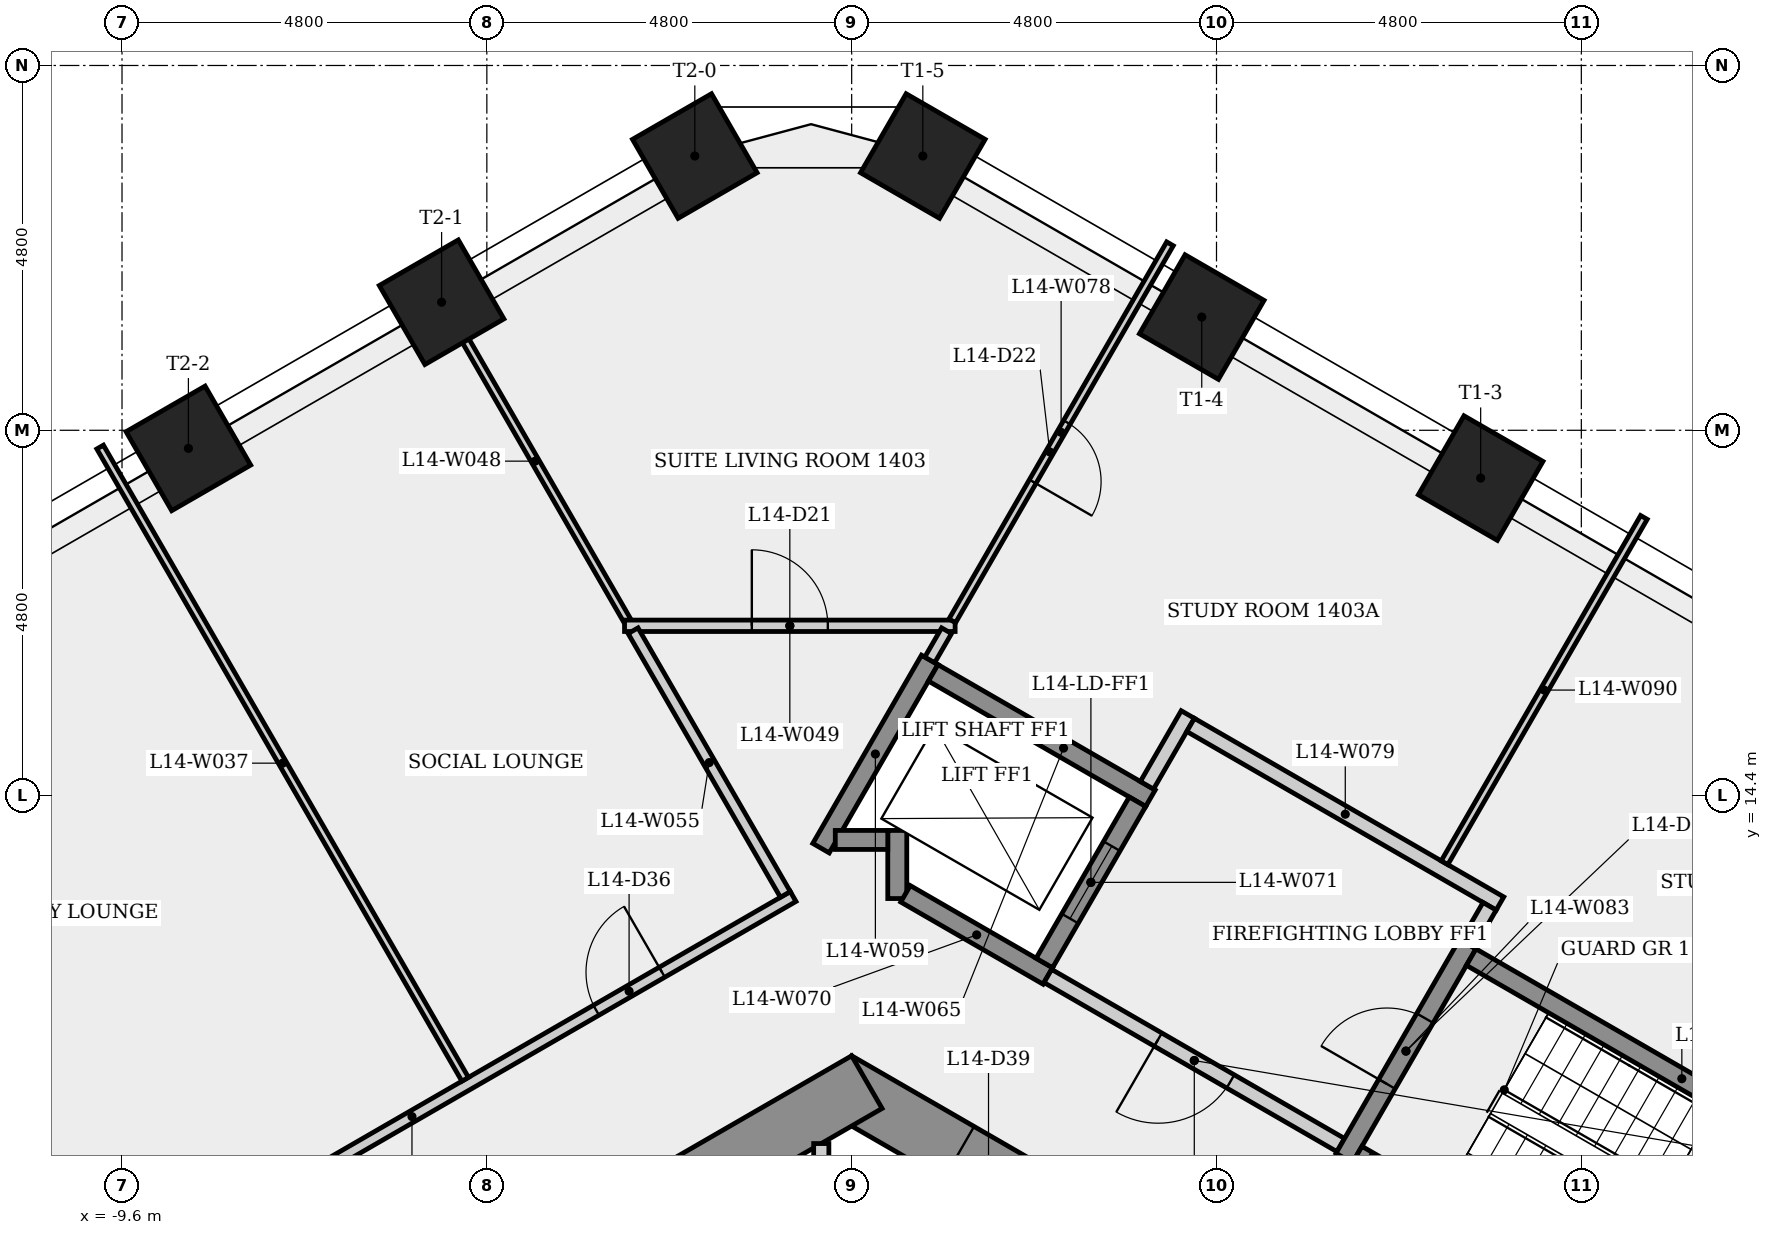
"""IFC4 building model, lengths in metres.
Left out: names, types, materials, properties, quantities, classifications, styles, units other than length and angle.
Written with IfcOpenShell. Run it as: python <this file> out.ifc"""

import sys

from ifc_helpers import new_model, si_unit, direction, frame, frame_2d, origin, origin_2d, place, context, subcontext, project, spatial, rectangle, extrude, element, fill, save


model = new_model("IFC4")
c1 = context("Model", 3, precision=1e-05, world=origin(), true_north=direction((0.0, 1.0)))
c2 = subcontext(c1, "Body", "Model", "MODEL_VIEW")
j1 = project(units=[si_unit("LENGTHUNIT", "METRE"), si_unit("PLANEANGLEUNIT", "RADIAN")], contexts=[c1])
p1 = place(None, origin())
s1 = spatial("IfcSite", under=j1, at=p1, CompositionType="ELEMENT")
p2 = place(p1, origin())
s2 = spatial("IfcBuilding", under=s1, at=p2, CompositionType="ELEMENT")
p3 = place(p2, frame((0.0, 0.0, 56.1)))
s3 = spatial("IfcBuildingStorey", under=s2, at=p3, CompositionType="ELEMENT", Elevation=56.1)
p4 = place(p3, frame((9.3, 5.138, 0.0), z_axis=(0.0, 0.0, 1.0), x_axis=(-0.866023993627, 0.500002442456, 0.0)))
e1 = element("IfcWall", 1, at=p4, inside=s3, PredefinedType="SHEAR", context=c2, shape_type="SweptSolid", body=[
    extrude(rectangle(XDim=10.97, YDim=0.8, at=frame_2d((5.485, 0.0))), origin(), (0.0, 0.0, 1.0), 3.4),
])
p5 = place(p4, frame((8.21, 0.0, 0.0)))
e2 = element("IfcOpeningElement", 2, at=p5, cuts=e1, PredefinedType="OPENING", context=c2, shape_type="SweptSolid", body=[
    extrude(rectangle(XDim=0.9, YDim=2.1, at=frame_2d((0.45, 1.05))), frame((0.0, 0.41, 0.0), z_axis=(0.0, -1.0, 0.0), x_axis=(1.0, 0.0, 0.0)), (0.0, 0.0, 1.0), 0.82),
])
p6 = place(p4, frame((2.126, 0.0, 0.0)))
e3 = element("IfcOpeningElement", 3, at=p6, cuts=e1, PredefinedType="OPENING", context=c2, shape_type="SweptSolid", body=[
    extrude(rectangle(XDim=0.9, YDim=2.1, at=frame_2d((0.45, 1.05))), frame((0.0, 0.41, 0.0), z_axis=(0.0, -1.0, 0.0), x_axis=(1.0, 0.0, 0.0)), (0.0, 0.0, 1.0), 0.82),
])
p7 = place(p3, frame((0.2, 10.623, 0.0), z_axis=(0.0, 0.0, 1.0), x_axis=(-0.866023993627, -0.500002442456, 0.0)))
e4 = element("IfcWall", 4, at=p7, inside=s3, PredefinedType="SHEAR", context=c2, shape_type="SweptSolid", body=[
    extrude(rectangle(XDim=10.97, YDim=0.8, at=frame_2d((5.485, 0.0))), origin(), (0.0, 0.0, 1.0), 3.4),
])
p8 = place(p7, frame((6.877, 0.0, 0.0)))
e5 = element("IfcOpeningElement", 5, at=p8, cuts=e4, PredefinedType="OPENING", context=c2, shape_type="SweptSolid", body=[
    extrude(rectangle(XDim=0.9, YDim=2.1, at=frame_2d((0.45, 1.05))), frame((0.0, 0.41, 0.0), z_axis=(0.0, -1.0, 0.0), x_axis=(1.0, 0.0, 0.0)), (0.0, 0.0, 1.0), 0.82),
])
for number, where, z_axis, x_axis in (
    (6, (8.276, 18.571, 0.0), (0.0, 0.0, 1.0), (0.5, 0.866, 0.0)),
    (7, (4.606, 20.69, 0.0), (0.0, 0.0, 1.0), (0.5, 0.866, 0.0)),
    (8, (0.936, 22.808, 0.0), (0.0, 0.0, 1.0), (0.5, 0.866, 0.0)),
    (9, (-2.064, 22.808, 0.0), (0.0, 0.0, 1.0), (-0.5, 0.866, 0.0)),
    (10, (-5.395, 20.885, 0.0), (0.0, 0.0, 1.0), (-0.5, 0.866, 0.0)),
    (11, (-8.727, 18.962, 0.0), (0.0, 0.0, 1.0), (-0.5, 0.866, 0.0)),
):
    element("IfcColumn", number, at=place(p3, frame(where, z_axis=z_axis, x_axis=x_axis)), inside=s3, PredefinedType="COLUMN", context=c2, shape_type="SweptSolid", body=[
        extrude(rectangle(XDim=1.2, YDim=1.2, at=origin_2d()), origin(), (0.0, 0.0, 1.0), 3.4),
    ])
p9 = place(p3, frame((-10.8, 7.275, 0.0), z_axis=(0.0, 0.0, 1.0), x_axis=(0.866027969706, 0.499995555667, 0.0)))
e12 = element("IfcWall", 12, at=p9, inside=s3, PredefinedType="PARTITIONING", context=c2, shape_type="SweptSolid", body=[
    extrude(rectangle(XDim=11.582, YDim=0.15, at=frame_2d((5.791, 0.0))), origin(), (0.0, 0.0, 1.0), 3.05),
])
p10 = place(p9, frame((8.589, 0.0, 0.0)))
e13 = element("IfcOpeningElement", 13, at=p10, cuts=e12, PredefinedType="OPENING", context=c2, shape_type="SweptSolid", body=[
    extrude(rectangle(XDim=1.0, YDim=2.1, at=frame_2d((0.5, 1.05))), frame((0.0, 0.085, 0.0), z_axis=(0.0, -1.0, 0.0), x_axis=(1.0, 0.0, 0.0)), (0.0, 0.0, 1.0), 0.17),
])
p11 = place(p3, frame((-5.085, 10.661, 0.0), z_axis=(0.0, 0.0, 1.0), x_axis=(-0.49998793222, 0.866032371008, 0.0)))
e14 = element("IfcWall", 14, at=p11, inside=s3, PredefinedType="PARTITIONING", context=c2, shape_type="SweptSolid", body=[
    extrude(rectangle(XDim=9.606, YDim=0.1, at=frame_2d((4.803, 0.0))), origin(), (0.0, 0.0, 1.0), 3.05),
])
p12 = place(p3, frame((-2.951, 16.692, 0.0), z_axis=(0.0, 0.0, 1.0), x_axis=(-0.499975014836, 0.866039828495, 0.0)))
e15 = element("IfcWall", 15, at=p12, inside=s3, PredefinedType="PARTITIONING", context=c2, shape_type="SweptSolid", body=[
    extrude(rectangle(XDim=4.853, YDim=0.1, at=frame_2d((2.427, 0.0))), origin(), (0.0, 0.0, 1.0), 3.05),
])
p13 = place(p3, frame((-2.988, 16.627, 0.0), z_axis=(0.0, 0.0, 1.0), x_axis=(1.0, 0.0, 0.0)))
e16 = element("IfcWall", 16, at=p13, inside=s3, PredefinedType="PARTITIONING", context=c2, shape_type="SweptSolid", body=[
    extrude(rectangle(XDim=4.349, YDim=0.15, at=frame_2d((2.175, 0.0))), origin(), (0.0, 0.0, 1.0), 3.05),
])
p14 = place(p13, frame((1.675, 0.0, 0.0)))
e17 = element("IfcOpeningElement", 17, at=p14, cuts=e16, PredefinedType="OPENING", context=c2, shape_type="SweptSolid", body=[
    extrude(rectangle(XDim=1.0, YDim=2.1, at=frame_2d((0.5, 1.05))), frame((0.0, 0.085, 0.0), z_axis=(0.0, -1.0, 0.0), x_axis=(1.0, 0.0, 0.0)), (0.0, 0.0, 1.0), 0.17),
])
p15 = place(p3, frame((-0.873, 13.093, 0.0), z_axis=(0.0, 0.0, 1.0), x_axis=(-0.500031897912, 0.866006986733, 0.0)))
e18 = element("IfcWall", 18, at=p15, inside=s3, PredefinedType="PARTITIONING", context=c2, shape_type="SweptSolid", body=[
    extrude(rectangle(XDim=4.007, YDim=0.15, at=frame_2d((2.003, 0.0))), origin(), (0.0, 0.0, 1.0), 3.05),
])
p16 = place(p3, frame((-0.4, 9.815, 0.0), z_axis=(0.0, 0.0, 1.0), x_axis=(0.0, -1.0, 0.0)))
e19 = element("IfcWall", 19, at=p16, inside=s3, PredefinedType="PARTITIONING", context=c2, shape_type="SweptSolid", body=[
    extrude(rectangle(XDim=4.54, YDim=0.2, at=frame_2d((2.27, 0.0))), origin(), (0.0, 0.0, 1.0), 3.05),
])
p17 = place(p3, frame((-0.403, 13.702, 0.0), z_axis=(0.0, 0.0, 1.0), x_axis=(0.499976111731, 0.866039195244, 0.0)))
e20 = element("IfcWall", 20, at=p17, inside=s3, PredefinedType="SHEAR", context=c2, shape_type="SweptSolid", body=[
    extrude(rectangle(XDim=2.861, YDim=0.25, at=frame_2d((1.43, 0.0))), origin(), (0.0, 0.0, 1.0), 3.05),
])
p18 = place(p3, frame((0.6, 13.039, 0.0), z_axis=(0.0, 0.0, 1.0), x_axis=(0.0, 1.0, 0.0)))
e21 = element("IfcWall", 21, at=p18, inside=s3, PredefinedType="SHEAR", context=c2, shape_type="SweptSolid", body=[
    extrude(rectangle(XDim=0.896, YDim=0.25, at=frame_2d((0.448, 0.0))), origin(), (0.0, 0.0, 1.0), 3.05),
])
p19 = place(p3, frame((0.475, 13.81, 0.0), z_axis=(0.0, 0.0, 1.0), x_axis=(-1.0, 0.0, 0.0)))
e22 = element("IfcWall", 22, at=p19, inside=s3, PredefinedType="SHEAR", context=c2, shape_type="SweptSolid", body=[
    extrude(rectangle(XDim=0.691, YDim=0.25, at=frame_2d((0.345, 0.0))), origin(), (0.0, 0.0, 1.0), 3.4),
])
p20 = place(p3, frame((1.073, 16.008, 0.0), z_axis=(0.0, 0.0, 1.0), x_axis=(0.866040211805, -0.499974350878, 0.0)))
e23 = element("IfcWall", 23, at=p20, inside=s3, PredefinedType="SHEAR", context=c2, shape_type="SweptSolid", body=[
    extrude(rectangle(XDim=3.3, YDim=0.25, at=frame_2d((1.65, 0.0))), origin(), (0.0, 0.0, 1.0), 3.05),
])
p21 = place(p3, frame((1.249, 16.562, 0.0), z_axis=(0.0, 0.0, 1.0), x_axis=(-0.49999285859, -0.86602952684, 0.0)))
e24 = element("IfcWall", 24, at=p21, inside=s3, PredefinedType="PARTITIONING", context=c2, shape_type="SweptSolid", body=[
    extrude(rectangle(XDim=0.443, YDim=0.15, at=frame_2d((0.221, 0.0))), origin(), (0.0, 0.0, 1.0), 3.05),
])
p22 = place(p3, frame((2.581, 12.02, 0.0), z_axis=(0.0, 0.0, 1.0), x_axis=(-0.86603892542, 0.499976579108, 0.0)))
e25 = element("IfcWall", 25, at=p22, inside=s3, PredefinedType="SHEAR", context=c2, shape_type="SweptSolid", body=[
    extrude(rectangle(XDim=2.162, YDim=0.25, at=frame_2d((1.081, 0.0))), origin(), (0.0, 0.0, 1.0), 3.05),
])
p23 = place(p3, frame((2.535, 12.191, 0.0), z_axis=(0.0, 0.0, 1.0), x_axis=(0.500061746146, 0.865989751695, 0.0)))
e26 = element("IfcWall", 26, at=p23, inside=s3, PredefinedType="SHEAR", context=c2, shape_type="SweptSolid", body=[
    extrude(rectangle(XDim=2.45, YDim=0.25, at=frame_2d((1.225, 0.0))), origin(), (0.0, 0.0, 1.0), 3.4),
])
p24 = place(p23, frame((0.675, 0.0, 0.0)))
e27 = element("IfcOpeningElement", 27, at=p24, cuts=e26, PredefinedType="OPENING", context=c2, shape_type="SweptSolid", body=[
    extrude(rectangle(XDim=1.1, YDim=2.1, at=frame_2d((0.55, 1.05))), frame((0.0, 0.135, 0.0), z_axis=(0.0, -1.0, 0.0), x_axis=(1.0, 0.0, 0.0)), (0.0, 0.0, 1.0), 0.27),
])
p25 = place(p3, frame((3.885, 14.529, 0.0), z_axis=(0.0, 0.0, 1.0), x_axis=(0.499997628298, 0.866026773083, 0.0)))
e28 = element("IfcWall", 28, at=p25, inside=s3, PredefinedType="PARTITIONING", context=c2, shape_type="SweptSolid", body=[
    extrude(rectangle(XDim=1.075, YDim=0.2, at=frame_2d((0.538, 0.0))), origin(), (0.0, 0.0, 1.0), 3.05),
])
p26 = place(p3, frame((4.188, 21.654, 0.0), z_axis=(0.0, 0.0, 1.0), x_axis=(-0.500021260655, -0.866013128592, 0.0)))
e29 = element("IfcWall", 29, at=p26, inside=s3, PredefinedType="PARTITIONING", context=c2, shape_type="SweptSolid", body=[
    extrude(rectangle(XDim=5.729, YDim=0.1, at=frame_2d((2.864, 0.0))), origin(), (0.0, 0.0, 1.0), 3.05),
])
p27 = place(p26, frame((2.712, 0.0, 0.0)))
e30 = element("IfcOpeningElement", 30, at=p27, cuts=e29, PredefinedType="OPENING", context=c2, shape_type="SweptSolid", body=[
    extrude(rectangle(XDim=0.9, YDim=2.1, at=frame_2d((0.45, 1.05))), frame((0.0, 0.06, 0.0), z_axis=(0.0, -1.0, 0.0), x_axis=(1.0, 0.0, 0.0)), (0.0, 0.0, 1.0), 0.12),
])
p28 = place(p3, frame((4.459, 15.323, 0.0), z_axis=(0.0, 0.0, 1.0), x_axis=(0.866016039709, -0.500016218704, 0.0)))
e31 = element("IfcWall", 31, at=p28, inside=s3, PredefinedType="PARTITIONING", context=c2, shape_type="SweptSolid", body=[
    extrude(rectangle(XDim=4.7, YDim=0.2, at=frame_2d((2.35, 0.0))), origin(), (0.0, 0.0, 1.0), 3.05),
])
p29 = place(p3, frame((6.435, 9.795, 0.0), z_axis=(0.0, 0.0, 1.0), x_axis=(-0.866012907634, 0.500021643343, 0.0)))
e32 = element("IfcWall", 32, at=p29, inside=s3, PredefinedType="PARTITIONING", context=c2, shape_type="SweptSolid", body=[
    extrude(rectangle(XDim=4.45, YDim=0.2, at=frame_2d((2.225, 0.0))), origin(), (0.0, 0.0, 1.0), 3.05),
])
p30 = place(p29, frame((1.675, 0.0, 0.0)))
e33 = element("IfcOpeningElement", 33, at=p30, cuts=e32, PredefinedType="OPENING", context=c2, shape_type="SweptSolid", body=[
    extrude(rectangle(XDim=1.1, YDim=2.1, at=frame_2d((0.55, 1.05))), frame((0.0, 0.11, 0.0), z_axis=(0.0, -1.0, 0.0), x_axis=(1.0, 0.0, 0.0)), (0.0, 0.0, 1.0), 0.22),
])
p31 = place(p3, frame((6.48, 9.624, 0.0), z_axis=(0.0, 0.0, 1.0), x_axis=(0.500017246033, 0.866015446554, 0.0)))
e34 = element("IfcWall", 34, at=p31, inside=s3, PredefinedType="SHEAR", context=c2, shape_type="SweptSolid", body=[
    extrude(rectangle(XDim=3.25, YDim=0.25, at=frame_2d((1.625, 0.0))), origin(), (0.0, 0.0, 1.0), 3.05),
])
p32 = place(p31, frame((1.125, 0.0, 0.0)))
e35 = element("IfcOpeningElement", 35, at=p32, cuts=e34, PredefinedType="OPENING", context=c2, shape_type="SweptSolid", body=[
    extrude(rectangle(XDim=1.0, YDim=2.1, at=frame_2d((0.5, 1.05))), frame((0.0, 0.135, 0.0), z_axis=(0.0, -1.0, 0.0), x_axis=(1.0, 0.0, 0.0)), (0.0, 0.0, 1.0), 0.27),
])
p33 = place(p3, frame((7.8, 13.51, 0.0), z_axis=(0.0, 0.0, 1.0), x_axis=(0.499962800384, 0.866046879928, 0.0)))
e36 = element("IfcWall", 36, at=p33, inside=s3, PredefinedType="PARTITIONING", context=c2, shape_type="SweptSolid", body=[
    extrude(rectangle(XDim=5.247, YDim=0.1, at=frame_2d((2.623, 0.0))), origin(), (0.0, 0.0, 1.0), 3.05),
])
p34 = place(p3, frame((8.151, 12.268, 0.0), z_axis=(0.0, 0.0, 1.0), x_axis=(0.866025499775, -0.499999833739, 0.0)))
e37 = element("IfcWall", 37, at=p34, inside=s3, PredefinedType="SHEAR", context=c2, shape_type="SweptSolid", body=[
    extrude(rectangle(XDim=6.4, YDim=0.25, at=frame_2d((3.2, 0.0))), origin(), (0.0, 0.0, 1.0), 3.05),
])
p35 = place(p3, frame((8.393, 12.937, 0.0), z_axis=(0.0, 0.0, 1.0), x_axis=(-0.500065409566, -0.86598763626, 0.0)))
e38 = element("IfcWall", 38, at=p35, inside=s3, PredefinedType="PARTITIONING", context=c2, shape_type="SweptSolid", body=[
    extrude(rectangle(XDim=0.575, YDim=0.2, at=frame_2d((0.288, 0.0))), origin(), (0.0, 0.0, 1.0), 3.05),
])
p36 = place(p3, frame((12.194, 6.47, 0.0), z_axis=(0.0, 0.0, 1.0), x_axis=(-0.866025499775, 0.499999833739, 0.0)))
e39 = element("IfcWall", 39, at=p36, inside=s3, PredefinedType="SHEAR", context=c2, shape_type="SweptSolid", body=[
    extrude(rectangle(XDim=6.4, YDim=0.25, at=frame_2d((3.2, 0.0))), origin(), (0.0, 0.0, 1.0), 3.05),
])
p37 = place(p36, frame((5.25, 0.0, 0.0)))
e40 = element("IfcOpeningElement", 40, at=p37, cuts=e39, PredefinedType="OPENING", context=c2, shape_type="SweptSolid", body=[
    extrude(rectangle(XDim=1.0, YDim=2.1, at=frame_2d((0.5, 1.05))), frame((0.0, 0.135, 0.0), z_axis=(0.0, -1.0, 0.0), x_axis=(1.0, 0.0, 0.0)), (0.0, 0.0, 1.0), 0.27),
])
p38 = place(p32, origin())
e41 = element("IfcDoor", 41, at=p38, inside=s3, OperationType="SINGLE_SWING_LEFT", PredefinedType="DOOR", context=c2, shape_type="SweptSolid", body=[
    extrude(rectangle(XDim=1.0, YDim=2.1, at=frame_2d((0.5, 1.05))), frame((0.0, 0.025, 0.0), z_axis=(0.0, -1.0, 0.0), x_axis=(1.0, 0.0, 0.0)), (0.0, 0.0, 1.0), 0.05),
])
fill(e35, e41)
p39 = place(p30, origin())
e42 = element("IfcDoor", 42, at=p39, inside=s3, OperationType="SINGLE_SWING_RIGHT", PredefinedType="DOOR", context=c2, shape_type="SweptSolid", body=[
    extrude(rectangle(XDim=1.1, YDim=2.1, at=frame_2d((0.55, 1.05))), frame((0.0, 0.025, 0.0), z_axis=(0.0, -1.0, 0.0), x_axis=(1.0, 0.0, 0.0)), (0.0, 0.0, 1.0), 0.05),
])
fill(e33, e42)
p40 = place(p24, origin())
e43 = element("IfcDoor", 43, at=p40, inside=s3, OperationType="SLIDING_TO_LEFT", PredefinedType="DOOR", context=c2, shape_type="SweptSolid", body=[
    extrude(rectangle(XDim=1.1, YDim=2.1, at=frame_2d((0.55, 1.05))), frame((0.0, 0.025, 0.0), z_axis=(0.0, -1.0, 0.0), x_axis=(1.0, 0.0, 0.0)), (0.0, 0.0, 1.0), 0.05),
])
fill(e27, e43)
p41 = place(p14, origin())
e44 = element("IfcDoor", 44, at=p41, inside=s3, OperationType="SINGLE_SWING_LEFT", PredefinedType="DOOR", context=c2, shape_type="SweptSolid", body=[
    extrude(rectangle(XDim=1.0, YDim=2.1, at=frame_2d((0.5, 1.05))), frame((0.0, 0.025, 0.0), z_axis=(0.0, -1.0, 0.0), x_axis=(1.0, 0.0, 0.0)), (0.0, 0.0, 1.0), 0.05),
])
fill(e17, e44)
p42 = place(p27, origin())
e45 = element("IfcDoor", 45, at=p42, inside=s3, OperationType="SINGLE_SWING_RIGHT", PredefinedType="DOOR", context=c2, shape_type="SweptSolid", body=[
    extrude(rectangle(XDim=0.9, YDim=2.1, at=frame_2d((0.45, 1.05))), frame((0.0, 0.025, 0.0), z_axis=(0.0, -1.0, 0.0), x_axis=(1.0, 0.0, 0.0)), (0.0, 0.0, 1.0), 0.05),
])
fill(e30, e45)
p43 = place(p10, origin())
e46 = element("IfcDoor", 46, at=p43, inside=s3, OperationType="SINGLE_SWING_RIGHT", PredefinedType="DOOR", context=c2, shape_type="SweptSolid", body=[
    extrude(rectangle(XDim=1.0, YDim=2.1, at=frame_2d((0.5, 1.05))), frame((0.0, 0.025, 0.0), z_axis=(0.0, -1.0, 0.0), x_axis=(1.0, 0.0, 0.0)), (0.0, 0.0, 1.0), 0.05),
])
fill(e13, e46)
p44 = place(p5, origin())
e47 = element("IfcDoor", 47, at=p44, inside=s3, OperationType="SINGLE_SWING_LEFT", PredefinedType="DOOR", context=c2, shape_type="SweptSolid", body=[
    extrude(rectangle(XDim=0.9, YDim=2.1, at=frame_2d((0.45, 1.05))), frame((0.0, 0.025, 0.0), z_axis=(0.0, -1.0, 0.0), x_axis=(1.0, 0.0, 0.0)), (0.0, 0.0, 1.0), 0.05),
])
fill(e2, e47)
save(model, sys.argv[1])
